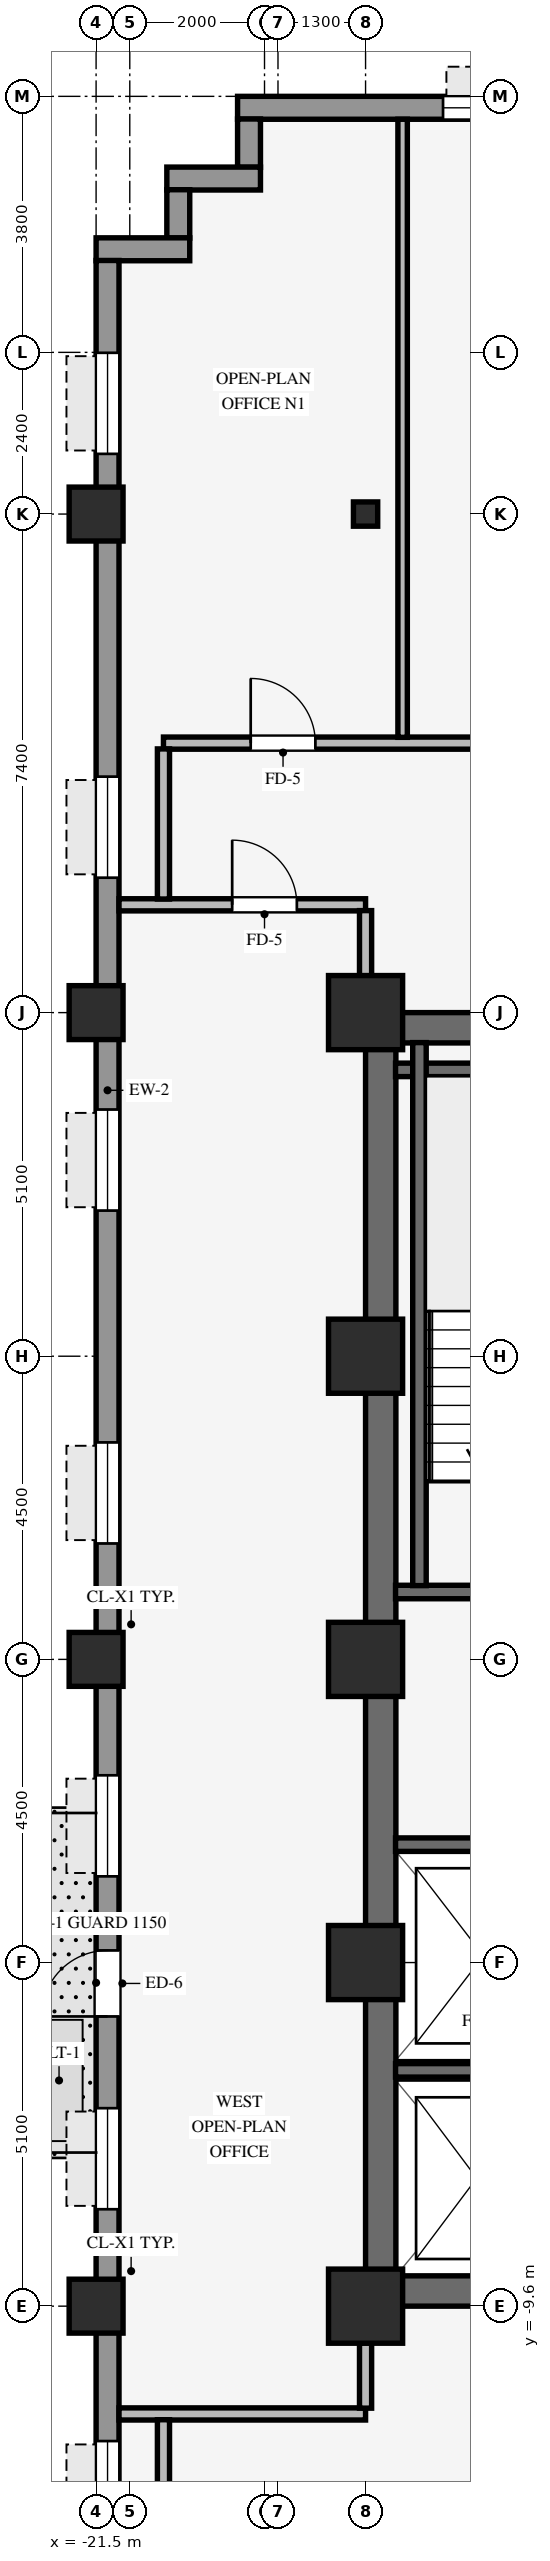
"""IFC4 building model, lengths in metres.
Left out: names, types, materials, properties, quantities, classifications, styles, units other than length and angle.
Written with IfcOpenShell. Run it as: python <this file> out.ifc"""

import sys

from ifc_helpers import new_model, si_unit, direction, frame, frame_2d, origin, origin_2d, place, context, subcontext, project, spatial, rectangle, hollow_rectangle, i_section, extrude, source, transform, mapped, element, fill, save


model = new_model("IFC4")
c1 = context("Model", 3, precision=1e-05, world=origin(), true_north=direction((0.0, 1.0)))
c2 = subcontext(c1, "Body", "Model", "MODEL_VIEW")
j1 = project(units=[si_unit("LENGTHUNIT", "METRE"), si_unit("PLANEANGLEUNIT", "RADIAN")], contexts=[c1])
p1 = place(None, origin())
s1 = spatial("IfcSite", under=j1, at=p1, CompositionType="ELEMENT")
p2 = place(p1, origin())
s2 = spatial("IfcBuilding", under=s1, at=p2, CompositionType="ELEMENT")
p3 = place(p2, frame((0.0, 0.0, 56.8)))
s3 = spatial("IfcBuildingStorey", under=s2, at=p3, CompositionType="ELEMENT", Elevation=56.8)
for number, where, z_axis, x_axis in (
    (1, (-17.5, -9.375, 0.0), (0.0, 0.0, 1.0), (1.0, 0.0, 0.0)),
    (2, (-17.5, 9.375, 0.0), (0.0, 0.0, 1.0), (1.0, 0.0, 0.0)),
):
    element("IfcWall", number, at=place(p3, frame(where, z_axis=z_axis, x_axis=x_axis)), inside=s3, PredefinedType="SHEAR", context=c2, shape_type="SweptSolid", body=[
        extrude(rectangle(XDim=8.5, YDim=0.45, at=frame_2d((4.25, 0.0))), origin(), (0.0, 0.0, 1.0), 3.37),
    ])
p4 = place(p3, frame((-17.275, -9.155, 0.0), z_axis=(0.0, 0.0, 1.0), x_axis=(0.0, 1.0, 0.0)))
e3 = element("IfcWall", 3, at=p4, inside=s3, PredefinedType="SHEAR", context=c2, shape_type="SweptSolid", body=[
    extrude(rectangle(XDim=18.31, YDim=0.45, at=frame_2d((9.155, 0.0))), origin(), (0.0, 0.0, 1.0), 3.37),
])
for number, where, z_axis, x_axis in (
    (4, (-17.5, -9.6, 0.0), (0.0, 0.0, 1.0), (1.0, 0.0, 0.0)),
    (5, (-17.5, -4.5, 0.0), (0.0, 0.0, 1.0), (1.0, 0.0, 0.0)),
    (6, (-17.5, 4.5, 0.0), (0.0, 0.0, 1.0), (1.0, 0.0, 0.0)),
    (7, (-17.5, 9.6, 0.0), (0.0, 0.0, 1.0), (1.0, 0.0, 0.0)),
    (8, (-17.5, 0.0, 0.0), (0.0, 0.0, 1.0), (1.0, 0.0, 0.0)),
):
    element("IfcColumn", number, at=place(p3, frame(where, z_axis=z_axis, x_axis=x_axis)), inside=s3, PredefinedType="COLUMN", context=c2, shape_type="SweptSolid", body=[
        extrude(rectangle(XDim=1.1, YDim=1.1, at=origin_2d()), origin(), (0.0, 0.0, 1.0), 3.37),
    ])
for number, where, z_axis, x_axis in (
    (9, (-21.5, -9.6, -0.4), (0.0, 0.0, 1.0), (1.0, 0.0, 0.0)),
    (10, (-21.5, 0.0, -0.4), (0.0, 0.0, 1.0), (1.0, 0.0, 0.0)),
    (11, (-21.5, 9.6, -0.4), (0.0, 0.0, 1.0), (1.0, 0.0, 0.0)),
    (12, (-21.5, 17.0, -0.4), (0.0, 0.0, 1.0), (1.0, 0.0, 0.0)),
):
    element("IfcColumn", number, at=place(p3, frame(where, z_axis=z_axis, x_axis=x_axis)), inside=s3, PredefinedType="COLUMN", context=c2, shape_type="SweptSolid", body=[
        extrude(hollow_rectangle(XDim=0.8, YDim=0.8, WallThickness=0.055, InnerFilletRadius=0.055, OuterFilletRadius=0.11, at=origin_2d()), origin(), (0.0, 0.0, 1.0), 3.77),
    ])
p5 = place(p3, frame((-17.5, 17.0, 0.0), z_axis=(0.0, 0.0, 1.0), x_axis=(1.0, 0.0, 0.0)))
e13 = element("IfcColumn", 13, at=p5, inside=s3, PredefinedType="COLUMN", context=c2, shape_type="SweptSolid", body=[
    extrude(i_section(OverallWidth=0.36, OverallDepth=0.36, WebThickness=0.021, FlangeThickness=0.021, FilletRadius=0.018, at=origin_2d()), origin(), (0.0, 0.0, 1.0), 3.37),
])
p6 = place(p3, frame((-19.4, 23.03, 0.0), z_axis=(0.0, 0.0, 1.0), x_axis=(1.0, 0.0, 0.0)))
e14 = element("IfcWall", 14, at=p6, inside=s3, PredefinedType="STANDARD", context=c2, shape_type="SweptSolid", body=[
    extrude(rectangle(XDim=38.8, YDim=0.34, at=frame_2d((19.4, 0.0))), origin(), (0.0, 0.0, 1.0), 2.705),
])
p7 = place(p6, frame((3.05, 0.0, 0.8)))
e15 = element("IfcOpeningElement", 15, at=p7, cuts=e14, PredefinedType="OPENING", context=c2, shape_type="SweptSolid", body=[
    extrude(rectangle(XDim=2.3, YDim=1.62, at=frame_2d((1.15, 0.81))), frame((0.0, 0.18, 0.0), z_axis=(0.0, -1.0, 0.0), x_axis=(1.0, 0.0, 0.0)), (0.0, 0.0, 1.0), 0.36),
])
p8 = place(p6, frame((5.85, 0.0, 0.8)))
e16 = element("IfcOpeningElement", 16, at=p8, cuts=e14, PredefinedType="OPENING", context=c2, shape_type="SweptSolid", body=[
    extrude(rectangle(XDim=2.3, YDim=1.62, at=frame_2d((1.15, 0.81))), frame((0.0, 0.18, 0.0), z_axis=(0.0, -1.0, 0.0), x_axis=(1.0, 0.0, 0.0)), (0.0, 0.0, 1.0), 0.36),
])
p9 = place(p6, frame((11.35, 0.0, 0.8)))
e17 = element("IfcOpeningElement", 17, at=p9, cuts=e14, PredefinedType="OPENING", context=c2, shape_type="SweptSolid", body=[
    extrude(rectangle(XDim=2.3, YDim=1.62, at=frame_2d((1.15, 0.81))), frame((0.0, 0.18, 0.0), z_axis=(0.0, -1.0, 0.0), x_axis=(1.0, 0.0, 0.0)), (0.0, 0.0, 1.0), 0.36),
])
p10 = place(p6, frame((15.95, 0.0, 0.8)))
e18 = element("IfcOpeningElement", 18, at=p10, cuts=e14, PredefinedType="OPENING", context=c2, shape_type="SweptSolid", body=[
    extrude(rectangle(XDim=2.3, YDim=1.62, at=frame_2d((1.15, 0.81))), frame((0.0, 0.18, 0.0), z_axis=(0.0, -1.0, 0.0), x_axis=(1.0, 0.0, 0.0)), (0.0, 0.0, 1.0), 0.36),
])
p11 = place(p6, frame((20.55, 0.0, 0.8)))
e19 = element("IfcOpeningElement", 19, at=p11, cuts=e14, PredefinedType="OPENING", context=c2, shape_type="SweptSolid", body=[
    extrude(rectangle(XDim=2.3, YDim=1.62, at=frame_2d((1.15, 0.81))), frame((0.0, 0.18, 0.0), z_axis=(0.0, -1.0, 0.0), x_axis=(1.0, 0.0, 0.0)), (0.0, 0.0, 1.0), 0.36),
])
p12 = place(p6, frame((25.15, 0.0, 0.8)))
e20 = element("IfcOpeningElement", 20, at=p12, cuts=e14, PredefinedType="OPENING", context=c2, shape_type="SweptSolid", body=[
    extrude(rectangle(XDim=2.3, YDim=1.62, at=frame_2d((1.15, 0.81))), frame((0.0, 0.18, 0.0), z_axis=(0.0, -1.0, 0.0), x_axis=(1.0, 0.0, 0.0)), (0.0, 0.0, 1.0), 0.36),
])
p13 = place(p6, frame((29.75, 0.0, 0.8)))
e21 = element("IfcOpeningElement", 21, at=p13, cuts=e14, PredefinedType="OPENING", context=c2, shape_type="SweptSolid", body=[
    extrude(rectangle(XDim=2.3, YDim=1.62, at=frame_2d((1.15, 0.81))), frame((0.0, 0.18, 0.0), z_axis=(0.0, -1.0, 0.0), x_axis=(1.0, 0.0, 0.0)), (0.0, 0.0, 1.0), 0.36),
])
p14 = place(p6, frame((34.35, 0.0, 0.8)))
e22 = element("IfcOpeningElement", 22, at=p14, cuts=e14, PredefinedType="OPENING", context=c2, shape_type="SweptSolid", body=[
    extrude(rectangle(XDim=2.3, YDim=1.62, at=frame_2d((1.15, 0.81))), frame((0.0, 0.18, 0.0), z_axis=(0.0, -1.0, 0.0), x_axis=(1.0, 0.0, 0.0)), (0.0, 0.0, 1.0), 0.36),
])
p15 = place(p3, frame((-19.23, 22.146, 0.0), z_axis=(0.0, 0.0, 1.0), x_axis=(0.0, 1.0, 0.0)))
e23 = element("IfcWall", 23, at=p15, inside=s3, PredefinedType="STANDARD", context=c2, shape_type="SweptSolid", body=[
    extrude(rectangle(XDim=0.718, YDim=0.34, at=frame_2d((0.359, 0.0))), origin(), (0.0, 0.0, 1.0), 3.36),
])
p16 = place(p3, frame((-20.45, 21.98, 0.0), z_axis=(0.0, 0.0, 1.0), x_axis=(1.0, 0.0, 0.0)))
e24 = element("IfcWall", 24, at=p16, inside=s3, PredefinedType="STANDARD", context=c2, shape_type="SweptSolid", body=[
    extrude(rectangle(XDim=1.39, YDim=0.34, at=frame_2d((0.695, 0.0))), origin(), (0.0, 0.0, 1.0), 3.36),
])
p17 = place(p3, frame((-20.28, 21.096, 0.0), z_axis=(0.0, 0.0, 1.0), x_axis=(0.0, 1.0, 0.0)))
e25 = element("IfcWall", 25, at=p17, inside=s3, PredefinedType="STANDARD", context=c2, shape_type="SweptSolid", body=[
    extrude(rectangle(XDim=0.718, YDim=0.34, at=frame_2d((0.359, 0.0))), origin(), (0.0, 0.0, 1.0), 3.36),
])
p18 = place(p3, frame((-21.5, 20.93, 0.0), z_axis=(0.0, 0.0, 1.0), x_axis=(1.0, 0.0, 0.0)))
e26 = element("IfcWall", 26, at=p18, inside=s3, PredefinedType="STANDARD", context=c2, shape_type="SweptSolid", body=[
    extrude(rectangle(XDim=1.39, YDim=0.34, at=frame_2d((0.695, 0.0))), origin(), (0.0, 0.0, 1.0), 3.36),
])
p19 = place(p3, frame((-21.33, -20.764, 0.0), z_axis=(0.0, 0.0, 1.0), x_axis=(0.0, 1.0, 0.0)))
e27 = element("IfcWall", 27, at=p19, inside=s3, PredefinedType="STANDARD", context=c2, shape_type="SweptSolid", body=[
    extrude(rectangle(XDim=41.528, YDim=0.34, at=frame_2d((20.764, 0.0))), origin(), (0.0, 0.0, 1.0), 2.705),
])
p20 = place(p19, frame((15.464, 0.0, 0.0)))
e28 = element("IfcOpeningElement", 28, at=p20, cuts=e27, PredefinedType="OPENING", context=c2, shape_type="SweptSolid", body=[
    extrude(rectangle(XDim=0.98, YDim=2.15, at=frame_2d((0.49, 1.075))), frame((0.0, 0.18, 0.0), z_axis=(0.0, -1.0, 0.0), x_axis=(1.0, 0.0, 0.0)), (0.0, 0.0, 1.0), 0.36),
])
p21 = place(p19, frame((1.371, 0.0, 0.8)))
e29 = element("IfcOpeningElement", 29, at=p21, cuts=e27, PredefinedType="OPENING", context=c2, shape_type="SweptSolid", body=[
    extrude(rectangle(XDim=1.5, YDim=1.6, at=frame_2d((0.75, 0.8))), frame((0.0, 0.18, 0.0), z_axis=(0.0, -1.0, 0.0), x_axis=(1.0, 0.0, 0.0)), (0.0, 0.0, 1.0), 0.36),
])
p22 = place(p19, frame((7.662, 0.0, 0.8)))
e30 = element("IfcOpeningElement", 30, at=p22, cuts=e27, PredefinedType="OPENING", context=c2, shape_type="SweptSolid", body=[
    extrude(rectangle(XDim=1.5, YDim=1.6, at=frame_2d((0.75, 0.8))), frame((0.0, 0.18, 0.0), z_axis=(0.0, -1.0, 0.0), x_axis=(1.0, 0.0, 0.0)), (0.0, 0.0, 1.0), 0.36),
])
p23 = place(p19, frame((12.603, 0.0, 0.8)))
e31 = element("IfcOpeningElement", 31, at=p23, cuts=e27, PredefinedType="OPENING", context=c2, shape_type="SweptSolid", body=[
    extrude(rectangle(XDim=1.5, YDim=1.6, at=frame_2d((0.75, 0.8))), frame((0.0, 0.18, 0.0), z_axis=(0.0, -1.0, 0.0), x_axis=(1.0, 0.0, 0.0)), (0.0, 0.0, 1.0), 0.36),
])
p24 = place(p19, frame((17.543, 0.0, 0.8)))
e32 = element("IfcOpeningElement", 32, at=p24, cuts=e27, PredefinedType="OPENING", context=c2, shape_type="SweptSolid", body=[
    extrude(rectangle(XDim=1.5, YDim=1.6, at=frame_2d((0.75, 0.8))), frame((0.0, 0.18, 0.0), z_axis=(0.0, -1.0, 0.0), x_axis=(1.0, 0.0, 0.0)), (0.0, 0.0, 1.0), 0.36),
])
p25 = place(p19, frame((22.485, 0.0, 0.8)))
e33 = element("IfcOpeningElement", 33, at=p25, cuts=e27, PredefinedType="OPENING", context=c2, shape_type="SweptSolid", body=[
    extrude(rectangle(XDim=1.5, YDim=1.6, at=frame_2d((0.75, 0.8))), frame((0.0, 0.18, 0.0), z_axis=(0.0, -1.0, 0.0), x_axis=(1.0, 0.0, 0.0)), (0.0, 0.0, 1.0), 0.36),
])
p26 = place(p19, frame((27.426, 0.0, 0.8)))
e34 = element("IfcOpeningElement", 34, at=p26, cuts=e27, PredefinedType="OPENING", context=c2, shape_type="SweptSolid", body=[
    extrude(rectangle(XDim=1.5, YDim=1.6, at=frame_2d((0.75, 0.8))), frame((0.0, 0.18, 0.0), z_axis=(0.0, -1.0, 0.0), x_axis=(1.0, 0.0, 0.0)), (0.0, 0.0, 1.0), 0.36),
])
p27 = place(p19, frame((32.366, 0.0, 0.8)))
e35 = element("IfcOpeningElement", 35, at=p27, cuts=e27, PredefinedType="OPENING", context=c2, shape_type="SweptSolid", body=[
    extrude(rectangle(XDim=1.5, YDim=1.6, at=frame_2d((0.75, 0.8))), frame((0.0, 0.18, 0.0), z_axis=(0.0, -1.0, 0.0), x_axis=(1.0, 0.0, 0.0)), (0.0, 0.0, 1.0), 0.36),
])
p28 = place(p19, frame((38.657, 0.0, 0.8)))
e36 = element("IfcOpeningElement", 36, at=p28, cuts=e27, PredefinedType="OPENING", context=c2, shape_type="SweptSolid", body=[
    extrude(rectangle(XDim=1.5, YDim=1.6, at=frame_2d((0.75, 0.8))), frame((0.0, 0.18, 0.0), z_axis=(0.0, -1.0, 0.0), x_axis=(1.0, 0.0, 0.0)), (0.0, 0.0, 1.0), 0.36),
])
for number, where, z_axis, x_axis in (
    (37, (-17.055, 1.0, 0.0), (0.0, 0.0, 1.0), (1.0, 0.0, 0.0)),
    (38, (-17.055, 8.75, 0.0), (0.0, 0.0, 1.0), (1.0, 0.0, 0.0)),
):
    element("IfcWall", number, at=place(p3, frame(where, z_axis=z_axis, x_axis=x_axis)), inside=s3, PredefinedType="SHEAR", context=c2, shape_type="SweptSolid", body=[
        extrude(rectangle(XDim=3.52, YDim=0.2, at=frame_2d((1.76, 0.0))), origin(), (0.0, 0.0, 1.0), 3.37),
    ])
p29 = place(p3, frame((-16.7, 1.095, 0.0), z_axis=(0.0, 0.0, 1.0), x_axis=(0.0, 1.0, 0.0)))
e39 = element("IfcWall", 39, at=p29, inside=s3, PredefinedType="SHEAR", context=c2, shape_type="SweptSolid", body=[
    extrude(rectangle(XDim=8.06, YDim=0.2, at=frame_2d((4.03, 0.0))), origin(), (0.0, 0.0, 1.0), 3.37),
])
p30 = place(p3, frame((-17.055, -6.1, 0.0), z_axis=(0.0, 0.0, 1.0), x_axis=(1.0, 0.0, 0.0)))
e40 = element("IfcWall", 40, at=p30, inside=s3, PredefinedType="SHEAR", context=c2, shape_type="SweptSolid", body=[
    extrude(rectangle(XDim=2.805, YDim=0.2, at=frame_2d((1.402, 0.0))), origin(), (0.0, 0.0, 1.0), 3.37),
])
p31 = place(p3, frame((-17.055, -2.75, 0.0), z_axis=(0.0, 0.0, 1.0), x_axis=(1.0, 0.0, 0.0)))
e41 = element("IfcWall", 41, at=p31, inside=s3, PredefinedType="SHEAR", context=c2, shape_type="SweptSolid", body=[
    extrude(rectangle(XDim=2.61, YDim=0.2, at=frame_2d((1.305, 0.0))), origin(), (0.0, 0.0, 1.0), 3.37),
])
p32 = place(p3, frame((-21.16, -11.2, 0.0), z_axis=(0.0, 0.0, 1.0), x_axis=(1.0, 0.0, 0.0)))
e42 = element("IfcWall", 42, at=p32, inside=s3, PredefinedType="PARTITIONING", context=c2, shape_type="SweptSolid", body=[
    extrude(rectangle(XDim=3.66, YDim=0.18, at=frame_2d((1.83, 0.0))), origin(), (0.0, 0.0, 1.0), 3.36),
])
p33 = place(p3, frame((-21.16, 11.2, 0.0), z_axis=(0.0, 0.0, 1.0), x_axis=(1.0, 0.0, 0.0)))
e43 = element("IfcWall", 43, at=p33, inside=s3, PredefinedType="PARTITIONING", context=c2, shape_type="SweptSolid", body=[
    extrude(rectangle(XDim=3.66, YDim=0.18, at=frame_2d((1.83, 0.0))), origin(), (0.0, 0.0, 1.0), 3.36),
])
p34 = place(p33, frame((1.68, 0.0, 0.0)))
e44 = element("IfcOpeningElement", 44, at=p34, cuts=e43, PredefinedType="OPENING", context=c2, shape_type="SweptSolid", body=[
    extrude(rectangle(XDim=0.96, YDim=2.1, at=frame_2d((0.48, 1.05))), frame((0.0, 0.1, 0.0), z_axis=(0.0, -1.0, 0.0), x_axis=(1.0, 0.0, 0.0)), (0.0, 0.0, 1.0), 0.2),
])
p35 = place(p3, frame((-20.5, 13.6, 0.0), z_axis=(0.0, 0.0, 1.0), x_axis=(1.0, 0.0, 0.0)))
e45 = element("IfcWall", 45, at=p35, inside=s3, PredefinedType="PARTITIONING", context=c2, shape_type="SweptSolid", body=[
    extrude(rectangle(XDim=5.5, YDim=0.18, at=frame_2d((2.75, 0.0))), origin(), (0.0, 0.0, 1.0), 2.942),
])
p36 = place(p35, frame((1.295, 0.0, 0.0)))
e46 = element("IfcOpeningElement", 46, at=p36, cuts=e45, PredefinedType="OPENING", context=c2, shape_type="SweptSolid", body=[
    extrude(rectangle(XDim=0.96, YDim=2.1, at=frame_2d((0.48, 1.05))), frame((0.0, 0.1, 0.0), z_axis=(0.0, -1.0, 0.0), x_axis=(1.0, 0.0, 0.0)), (0.0, 0.0, 1.0), 0.2),
])
for number, where, z_axis, x_axis in (
    (47, (-20.5, -13.514, 0.0), (0.0, 0.0, 1.0), (0.0, 1.0, 0.0)),
    (48, (-20.5, 11.286, 0.0), (0.0, 0.0, 1.0), (0.0, 1.0, 0.0)),
):
    element("IfcWall", number, at=place(p3, frame(where, z_axis=z_axis, x_axis=x_axis)), inside=s3, PredefinedType="PARTITIONING", context=c2, shape_type="SweptSolid", body=[
        extrude(rectangle(XDim=2.228, YDim=0.18, at=frame_2d((1.114, 0.0))), origin(), (0.0, 0.0, 1.0), 3.36),
    ])
for number, where, z_axis, x_axis in (
    (49, (-17.5, -11.114, 0.0), (0.0, 0.0, 1.0), (0.0, 1.0, 0.0)),
    (50, (-17.5, 10.146, 0.0), (0.0, 0.0, 1.0), (0.0, 1.0, 0.0)),
):
    element("IfcWall", number, at=place(p3, frame(where, z_axis=z_axis, x_axis=x_axis)), inside=s3, PredefinedType="PARTITIONING", context=c2, shape_type="SweptSolid", body=[
        extrude(rectangle(XDim=0.968, YDim=0.18, at=frame_2d((0.484, 0.0))), origin(), (0.0, 0.0, 1.0), 2.738),
    ])
p37 = place(p3, frame((-16.95, 13.686, 0.0), z_axis=(0.0, 0.0, 1.0), x_axis=(0.0, 1.0, 0.0)))
e51 = element("IfcWall", 51, at=p37, inside=s3, PredefinedType="PARTITIONING", context=c2, shape_type="SweptSolid", body=[
    extrude(rectangle(XDim=9.174, YDim=0.14, at=frame_2d((4.587, 0.0))), origin(), (0.0, 0.0, 1.0), 3.36),
])
m1 = source(origin(), c2, "Body", "SweptSolid", [
    extrude(rectangle(XDim=2.3, YDim=1.62, at=frame_2d((1.15, 0.81))), frame((0.0, 0.03, 0.0), z_axis=(0.0, -1.0, 0.0), x_axis=(1.0, 0.0, 0.0)), (0.0, 0.0, 1.0), 0.06),
])
p38 = place(p7, origin())
e52 = element("IfcWindow", 52, at=p38, inside=s3, PartitioningType="SINGLE_PANEL", PredefinedType="WINDOW", context=c2, shape_type="MappedRepresentation", body=[
    mapped(m1, transform((0.0, 0.0, 0.0), scale=1.0)),
])
fill(e15, e52)
m2 = source(origin(), c2, "Body", "SweptSolid", [
    extrude(rectangle(XDim=0.98, YDim=2.15, at=frame_2d((0.49, 1.075))), frame((0.0, 0.025, 0.0), z_axis=(0.0, -1.0, 0.0), x_axis=(1.0, 0.0, 0.0)), (0.0, 0.0, 1.0), 0.05),
])
p39 = place(p20, origin())
e53 = element("IfcDoor", 53, at=p39, inside=s3, OperationType="SINGLE_SWING_LEFT", PredefinedType="DOOR", context=c2, shape_type="MappedRepresentation", body=[
    mapped(m2, transform((0.0, 0.0, 0.0), scale=1.0)),
])
fill(e28, e53)
m3 = source(origin(), c2, "Body", "SweptSolid", [
    extrude(rectangle(XDim=1.5, YDim=1.6, at=frame_2d((0.75, 0.8))), frame((0.0, 0.03, 0.0), z_axis=(0.0, -1.0, 0.0), x_axis=(1.0, 0.0, 0.0)), (0.0, 0.0, 1.0), 0.06),
])
p40 = place(p22, origin())
e54 = element("IfcWindow", 54, at=p40, inside=s3, PartitioningType="SINGLE_PANEL", PredefinedType="WINDOW", context=c2, shape_type="MappedRepresentation", body=[
    mapped(m3, transform((0.0, 0.0, 0.0), scale=1.0)),
])
fill(e30, e54)
p41 = place(p23, origin())
e55 = element("IfcWindow", 55, at=p41, inside=s3, PartitioningType="SINGLE_PANEL", PredefinedType="WINDOW", context=c2, shape_type="MappedRepresentation", body=[
    mapped(m3, transform((0.0, 0.0, 0.0), scale=1.0)),
])
fill(e31, e55)
p42 = place(p24, origin())
e56 = element("IfcWindow", 56, at=p42, inside=s3, PartitioningType="SINGLE_PANEL", PredefinedType="WINDOW", context=c2, shape_type="MappedRepresentation", body=[
    mapped(m3, transform((0.0, 0.0, 0.0), scale=1.0)),
])
fill(e32, e56)
p43 = place(p25, origin())
e57 = element("IfcWindow", 57, at=p43, inside=s3, PartitioningType="SINGLE_PANEL", PredefinedType="WINDOW", context=c2, shape_type="MappedRepresentation", body=[
    mapped(m3, transform((0.0, 0.0, 0.0), scale=1.0)),
])
fill(e33, e57)
p44 = place(p26, origin())
e58 = element("IfcWindow", 58, at=p44, inside=s3, PartitioningType="SINGLE_PANEL", PredefinedType="WINDOW", context=c2, shape_type="MappedRepresentation", body=[
    mapped(m3, transform((0.0, 0.0, 0.0), scale=1.0)),
])
fill(e34, e58)
p45 = place(p27, origin())
e59 = element("IfcWindow", 59, at=p45, inside=s3, PartitioningType="SINGLE_PANEL", PredefinedType="WINDOW", context=c2, shape_type="MappedRepresentation", body=[
    mapped(m3, transform((0.0, 0.0, 0.0), scale=1.0)),
])
fill(e35, e59)
p46 = place(p28, origin())
e60 = element("IfcWindow", 60, at=p46, inside=s3, PartitioningType="SINGLE_PANEL", PredefinedType="WINDOW", context=c2, shape_type="MappedRepresentation", body=[
    mapped(m3, transform((0.0, 0.0, 0.0), scale=1.0)),
])
fill(e36, e60)
m4 = source(origin(), c2, "Body", "SweptSolid", [
    extrude(rectangle(XDim=0.96, YDim=2.1, at=frame_2d((0.48, 1.05))), frame((0.0, 0.025, 0.0), z_axis=(0.0, -1.0, 0.0), x_axis=(1.0, 0.0, 0.0)), (0.0, 0.0, 1.0), 0.05),
])
p47 = place(p36, origin())
e61 = element("IfcDoor", 61, at=p47, inside=s3, OperationType="SINGLE_SWING_LEFT", PredefinedType="DOOR", context=c2, shape_type="MappedRepresentation", body=[
    mapped(m4, transform((0.0, 0.0, 0.0), scale=1.0)),
])
fill(e46, e61)
p48 = place(p34, origin())
e62 = element("IfcDoor", 62, at=p48, inside=s3, OperationType="SINGLE_SWING_LEFT", PredefinedType="DOOR", context=c2, shape_type="MappedRepresentation", body=[
    mapped(m4, transform((0.0, 0.0, 0.0), scale=1.0)),
])
fill(e44, e62)
save(model, sys.argv[1])
